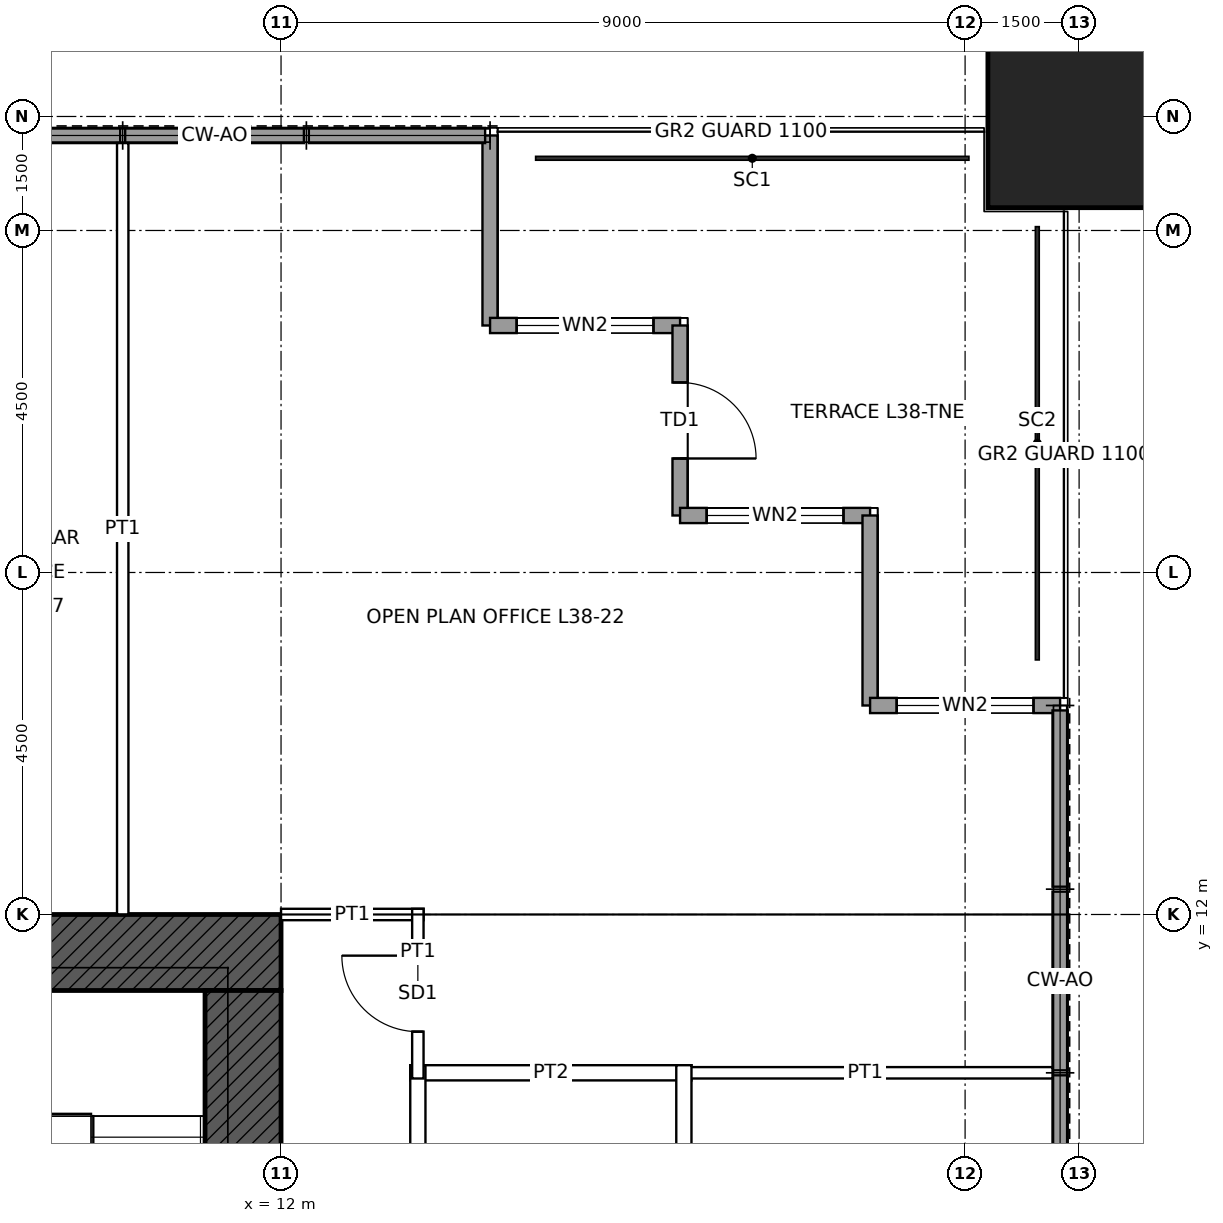
"""IFC4 building model, lengths in metres.
Left out: names, types, materials, properties, quantities, classifications, styles, units other than length and angle.
Written with IfcOpenShell. Run it as: python <this file> out.ifc"""

import sys

from ifc_helpers import new_model, si_unit, direction, frame, frame_2d, origin, origin_2d, place, context, subcontext, project, spatial, rectangle, hollow_rectangle, extrude, element, fill, save


model = new_model("IFC4")
c1 = context("Model", 3, precision=1e-05, world=origin(), true_north=direction((0.0, 1.0)))
c2 = subcontext(c1, "Body", "Model", "MODEL_VIEW")
j1 = project(units=[si_unit("LENGTHUNIT", "METRE"), si_unit("PLANEANGLEUNIT", "RADIAN")], contexts=[c1])
p1 = place(None, origin())
s1 = spatial("IfcSite", under=j1, at=p1, CompositionType="ELEMENT")
p2 = place(p1, origin())
s2 = spatial("IfcBuilding", under=s1, at=p2, CompositionType="ELEMENT")
p3 = place(p2, frame((0.0, 0.0, 185.9)))
s3 = spatial("IfcBuildingStorey", under=s2, at=p3, CompositionType="ELEMENT", Elevation=185.9)
p4 = place(p3, frame((22.5, 22.5, 0.0), z_axis=(0.0, 0.0, 1.0), x_axis=(1.0, 0.0, 0.0)))
e1 = element("IfcColumn", 1, at=p4, inside=s3, PredefinedType="COLUMN", context=c2, shape_type="SweptSolid", body=[
    extrude(hollow_rectangle(XDim=2.4, YDim=2.4, WallThickness=0.12, at=origin_2d()), origin(), (0.0, 0.0, 1.0), 4.0),
])
p5 = place(p3, frame((-12.0, 11.5, 0.0), z_axis=(0.0, 0.0, 1.0), x_axis=(1.0, 0.0, 0.0)))
e2 = element("IfcWall", 2, at=p5, inside=s3, PredefinedType="SHEAR", context=c2, shape_type="SweptSolid", body=[
    extrude(rectangle(XDim=24.0, YDim=1.0, at=frame_2d((12.0, 0.0))), origin(), (0.0, 0.0, 1.0), 4.0),
])
p6 = place(p5, frame((6.25, 0.0, 0.0)))
e3 = element("IfcOpeningElement", 3, at=p6, cuts=e2, PredefinedType="OPENING", context=c2, shape_type="SweptSolid", body=[
    extrude(rectangle(XDim=1.0, YDim=2.4, at=frame_2d((0.5, 1.2))), frame((0.0, 0.51, 0.0), z_axis=(0.0, -1.0, 0.0), x_axis=(1.0, 0.0, 0.0)), (0.0, 0.0, 1.0), 1.02),
])
p7 = place(p5, frame((16.75, 0.0, 0.0)))
e4 = element("IfcOpeningElement", 4, at=p7, cuts=e2, PredefinedType="OPENING", context=c2, shape_type="SweptSolid", body=[
    extrude(rectangle(XDim=1.0, YDim=2.4, at=frame_2d((0.5, 1.2))), frame((0.0, 0.51, 0.0), z_axis=(0.0, -1.0, 0.0), x_axis=(1.0, 0.0, 0.0)), (0.0, 0.0, 1.0), 1.02),
])
p8 = place(p3, frame((11.5, 11.0, 0.0), z_axis=(0.0, 0.0, 1.0), x_axis=(0.0, -1.0, 0.0)))
e5 = element("IfcWall", 5, at=p8, inside=s3, PredefinedType="SHEAR", context=c2, shape_type="SweptSolid", body=[
    extrude(rectangle(XDim=22.0, YDim=1.0, at=frame_2d((11.0, 0.0))), origin(), (0.0, 0.0, 1.0), 4.0),
])
p9 = place(p8, frame((10.5, 0.0, 0.0)))
e6 = element("IfcOpeningElement", 6, at=p9, cuts=e5, PredefinedType="OPENING", context=c2, shape_type="SweptSolid", body=[
    extrude(rectangle(XDim=1.0, YDim=2.4, at=frame_2d((0.5, 1.2))), frame((0.0, 0.51, 0.0), z_axis=(0.0, -1.0, 0.0), x_axis=(1.0, 0.0, 0.0)), (0.0, 0.0, 1.0), 1.02),
])
p10 = place(p3, frame((14.75, 22.25, 0.0), z_axis=(0.0, 0.0, 1.0), x_axis=(0.0, -1.0, 0.0)))
e7 = element("IfcWall", 7, at=p10, inside=s3, PredefinedType="SOLIDWALL", context=c2, shape_type="SweptSolid", body=[
    extrude(rectangle(XDim=2.5, YDim=0.2, at=frame_2d((1.25, 0.0))), origin(), (0.0, 0.0, 1.0), 3.85),
])
p11 = place(p3, frame((14.75, 19.75, 0.0), z_axis=(0.0, 0.0, 1.0), x_axis=(1.0, 0.0, 0.0)))
e8 = element("IfcWall", 8, at=p11, inside=s3, PredefinedType="SOLIDWALL", context=c2, shape_type="SweptSolid", body=[
    extrude(rectangle(XDim=2.5, YDim=0.2, at=frame_2d((1.25, 0.0))), origin(), (0.0, 0.0, 1.0), 3.85),
])
p12 = place(p11, frame((0.35, 0.0, 0.3)))
e9 = element("IfcOpeningElement", 9, at=p12, cuts=e8, PredefinedType="OPENING", context=c2, shape_type="SweptSolid", body=[
    extrude(rectangle(XDim=1.8, YDim=2.4, at=frame_2d((0.9, 1.2))), frame((0.0, 0.11, 0.0), z_axis=(0.0, -1.0, 0.0), x_axis=(1.0, 0.0, 0.0)), (0.0, 0.0, 1.0), 0.22),
])
p13 = place(p3, frame((17.25, 19.75, 0.0), z_axis=(0.0, 0.0, 1.0), x_axis=(0.0, -1.0, 0.0)))
e10 = element("IfcWall", 10, at=p13, inside=s3, PredefinedType="SOLIDWALL", context=c2, shape_type="SweptSolid", body=[
    extrude(rectangle(XDim=2.5, YDim=0.2, at=frame_2d((1.25, 0.0))), origin(), (0.0, 0.0, 1.0), 3.85),
])
p14 = place(p13, frame((0.75, 0.0, 0.0)))
e11 = element("IfcOpeningElement", 11, at=p14, cuts=e10, PredefinedType="OPENING", context=c2, shape_type="SweptSolid", body=[
    extrude(rectangle(XDim=1.0, YDim=2.4, at=frame_2d((0.5, 1.2))), frame((0.0, 0.11, 0.0), z_axis=(0.0, -1.0, 0.0), x_axis=(1.0, 0.0, 0.0)), (0.0, 0.0, 1.0), 0.22),
])
p15 = place(p3, frame((17.25, 17.25, 0.0), z_axis=(0.0, 0.0, 1.0), x_axis=(1.0, 0.0, 0.0)))
e12 = element("IfcWall", 12, at=p15, inside=s3, PredefinedType="SOLIDWALL", context=c2, shape_type="SweptSolid", body=[
    extrude(rectangle(XDim=2.5, YDim=0.2, at=frame_2d((1.25, 0.0))), origin(), (0.0, 0.0, 1.0), 3.85),
])
p16 = place(p15, frame((0.35, 0.0, 0.3)))
e13 = element("IfcOpeningElement", 13, at=p16, cuts=e12, PredefinedType="OPENING", context=c2, shape_type="SweptSolid", body=[
    extrude(rectangle(XDim=1.8, YDim=2.4, at=frame_2d((0.9, 1.2))), frame((0.0, 0.11, 0.0), z_axis=(0.0, -1.0, 0.0), x_axis=(1.0, 0.0, 0.0)), (0.0, 0.0, 1.0), 0.22),
])
p17 = place(p3, frame((19.75, 17.25, 0.0), z_axis=(0.0, 0.0, 1.0), x_axis=(0.0, -1.0, 0.0)))
e14 = element("IfcWall", 14, at=p17, inside=s3, PredefinedType="SOLIDWALL", context=c2, shape_type="SweptSolid", body=[
    extrude(rectangle(XDim=2.5, YDim=0.2, at=frame_2d((1.25, 0.0))), origin(), (0.0, 0.0, 1.0), 3.85),
])
p18 = place(p3, frame((19.75, 14.75, 0.0), z_axis=(0.0, 0.0, 1.0), x_axis=(1.0, 0.0, 0.0)))
e15 = element("IfcWall", 15, at=p18, inside=s3, PredefinedType="SOLIDWALL", context=c2, shape_type="SweptSolid", body=[
    extrude(rectangle(XDim=2.5, YDim=0.2, at=frame_2d((1.25, 0.0))), origin(), (0.0, 0.0, 1.0), 3.85),
])
p19 = place(p18, frame((0.35, 0.0, 0.3)))
e16 = element("IfcOpeningElement", 16, at=p19, cuts=e15, PredefinedType="OPENING", context=c2, shape_type="SweptSolid", body=[
    extrude(rectangle(XDim=1.8, YDim=2.4, at=frame_2d((0.9, 1.2))), frame((0.0, 0.11, 0.0), z_axis=(0.0, -1.0, 0.0), x_axis=(1.0, 0.0, 0.0)), (0.0, 0.0, 1.0), 0.22),
])
p20 = place(p3, frame((7.565, 22.25, 0.0), z_axis=(0.0, 0.0, 1.0), x_axis=(1.0, 0.0, 0.0)))
e17 = element("IfcWall", 17, at=p20, inside=s3, PredefinedType="SOLIDWALL", context=c2, shape_type="SweptSolid", body=[
    extrude(rectangle(XDim=2.319, YDim=0.2, at=frame_2d((1.16, 0.0))), origin(), (0.0, 0.0, 1.0), 3.85),
])
p21 = place(p3, frame((9.949, 22.25, 0.0), z_axis=(0.0, 0.0, 1.0), x_axis=(1.0, 0.0, 0.0)))
e18 = element("IfcWall", 18, at=p21, inside=s3, PredefinedType="SOLIDWALL", context=c2, shape_type="SweptSolid", body=[
    extrude(rectangle(XDim=2.352, YDim=0.2, at=frame_2d((1.176, 0.0))), origin(), (0.0, 0.0, 1.0), 3.85),
])
for number, where, z_axis, x_axis in (
    (19, (12.366, 22.25, 0.0), (0.0, 0.0, 1.0), (1.0, 0.0, 0.0)),
    (20, (22.25, 14.685, 0.0), (0.0, 0.0, 1.0), (0.0, -1.0, 0.0)),
):
    element("IfcWall", number, at=place(p3, frame(where, z_axis=z_axis, x_axis=x_axis)), inside=s3, PredefinedType="SOLIDWALL", context=c2, shape_type="SweptSolid", body=[
        extrude(rectangle(XDim=2.319, YDim=0.2, at=frame_2d((1.16, 0.0))), origin(), (0.0, 0.0, 1.0), 3.85),
    ])
p22 = place(p3, frame((22.25, 12.301, 0.0), z_axis=(0.0, 0.0, 1.0), x_axis=(0.0, -1.0, 0.0)))
e21 = element("IfcWall", 21, at=p22, inside=s3, PredefinedType="SOLIDWALL", context=c2, shape_type="SweptSolid", body=[
    extrude(rectangle(XDim=2.352, YDim=0.2, at=frame_2d((1.176, 0.0))), origin(), (0.0, 0.0, 1.0), 3.85),
])
p23 = place(p3, frame((22.25, 9.884, 0.0), z_axis=(0.0, 0.0, 1.0), x_axis=(0.0, -1.0, 0.0)))
e22 = element("IfcWall", 22, at=p23, inside=s3, PredefinedType="SOLIDWALL", context=c2, shape_type="SweptSolid", body=[
    extrude(rectangle(XDim=2.319, YDim=0.2, at=frame_2d((1.16, 0.0))), origin(), (0.0, 0.0, 1.0), 3.85),
])
p24 = place(p3, frame((13.7, 9.917, 0.0), z_axis=(0.0, 0.0, 1.0), x_axis=(1.0, 0.0, 0.0)))
e23 = element("IfcWall", 23, at=p24, inside=s3, PredefinedType="PARTITIONING", context=c2, shape_type="SweptSolid", body=[
    extrude(rectangle(XDim=3.7, YDim=0.2, at=frame_2d((1.85, 0.0))), origin(), (0.0, 0.0, 1.0), 3.85),
])
p25 = place(p3, frame((17.225, 9.917, 0.0), z_axis=(0.0, 0.0, 1.0), x_axis=(1.0, 0.0, 0.0)))
e24 = element("IfcWall", 24, at=p25, inside=s3, PredefinedType="PARTITIONING", context=c2, shape_type="SweptSolid", body=[
    extrude(rectangle(XDim=4.925, YDim=0.15, at=frame_2d((2.462, 0.0))), origin(), (0.0, 0.0, 1.0), 3.85),
])
p26 = place(p3, frame((12.0, 12.0, 0.0), z_axis=(0.0, 0.0, 1.0), x_axis=(1.0, 0.0, 0.0)))
e25 = element("IfcWall", 25, at=p26, inside=s3, PredefinedType="PARTITIONING", context=c2, shape_type="SweptSolid", body=[
    extrude(rectangle(XDim=1.875, YDim=0.15, at=frame_2d((0.938, 0.0))), origin(), (0.0, 0.0, 1.0), 2.908),
])
p27 = place(p3, frame((9.917, 12.0, 0.0), z_axis=(0.0, 0.0, 1.0), x_axis=(0.0, 1.0, 0.0)))
e26 = element("IfcWall", 26, at=p27, inside=s3, PredefinedType="PARTITIONING", context=c2, shape_type="SweptSolid", body=[
    extrude(rectangle(XDim=10.15, YDim=0.15, at=frame_2d((5.075, 0.0))), origin(), (0.0, 0.0, 1.0), 3.85),
])
p28 = place(p3, frame((13.8, 4.9, 0.0), z_axis=(0.0, 0.0, 1.0), x_axis=(0.0, 1.0, 0.0)))
e27 = element("IfcWall", 27, at=p28, inside=s3, PredefinedType="PARTITIONING", context=c2, shape_type="SweptSolid", body=[
    extrude(rectangle(XDim=5.117, YDim=0.2, at=frame_2d((2.559, 0.0))), origin(), (0.0, 0.0, 1.0), 3.85),
])
p29 = place(p3, frame((13.8, 9.842, 0.0), z_axis=(0.0, 0.0, 1.0), x_axis=(0.0, 1.0, 0.0)))
e28 = element("IfcWall", 28, at=p29, inside=s3, PredefinedType="PARTITIONING", context=c2, shape_type="SweptSolid", body=[
    extrude(rectangle(XDim=2.233, YDim=0.15, at=frame_2d((1.116, 0.0))), origin(), (0.0, 0.0, 1.0), 3.85),
])
p30 = place(p29, frame((0.616, 0.0, 0.0)))
e29 = element("IfcOpeningElement", 29, at=p30, cuts=e28, PredefinedType="OPENING", context=c2, shape_type="SweptSolid", body=[
    extrude(rectangle(XDim=1.0, YDim=2.4, at=frame_2d((0.5, 1.2))), frame((0.0, 0.085, 0.0), z_axis=(0.0, -1.0, 0.0), x_axis=(1.0, 0.0, 0.0)), (0.0, 0.0, 1.0), 0.17),
])
p31 = place(p3, frame((17.3, 4.9, 0.0), z_axis=(0.0, 0.0, 1.0), x_axis=(0.0, 1.0, 0.0)))
e30 = element("IfcWall", 30, at=p31, inside=s3, PredefinedType="PARTITIONING", context=c2, shape_type="SweptSolid", body=[
    extrude(rectangle(XDim=5.117, YDim=0.2, at=frame_2d((2.559, 0.0))), origin(), (0.0, 0.0, 1.0), 3.85),
])
p32 = place(p31, frame((2.059, 0.0, 0.0)))
e31 = element("IfcOpeningElement", 31, at=p32, cuts=e30, PredefinedType="OPENING", context=c2, shape_type="SweptSolid", body=[
    extrude(rectangle(XDim=1.0, YDim=2.1, at=frame_2d((0.5, 1.05))), frame((0.0, 0.11, 0.0), z_axis=(0.0, -1.0, 0.0), x_axis=(1.0, 0.0, 0.0)), (0.0, 0.0, 1.0), 0.22),
])
p33 = place(p12, origin())
e32 = element("IfcWindow", 32, at=p33, inside=s3, PartitioningType="SINGLE_PANEL", PredefinedType="WINDOW", context=c2, shape_type="SweptSolid", body=[
    extrude(rectangle(XDim=1.8, YDim=2.4, at=frame_2d((0.9, 1.2))), frame((0.0, 0.03, 0.0), z_axis=(0.0, -1.0, 0.0), x_axis=(1.0, 0.0, 0.0)), (0.0, 0.0, 1.0), 0.06),
])
fill(e9, e32)
p34 = place(p14, origin())
e33 = element("IfcDoor", 33, at=p34, inside=s3, OperationType="SINGLE_SWING_RIGHT", PredefinedType="DOOR", context=c2, shape_type="SweptSolid", body=[
    extrude(rectangle(XDim=1.0, YDim=2.4, at=frame_2d((0.5, 1.2))), frame((0.0, 0.025, 0.0), z_axis=(0.0, -1.0, 0.0), x_axis=(1.0, 0.0, 0.0)), (0.0, 0.0, 1.0), 0.05),
])
fill(e11, e33)
p35 = place(p16, origin())
e34 = element("IfcWindow", 34, at=p35, inside=s3, PartitioningType="SINGLE_PANEL", PredefinedType="WINDOW", context=c2, shape_type="SweptSolid", body=[
    extrude(rectangle(XDim=1.8, YDim=2.4, at=frame_2d((0.9, 1.2))), frame((0.0, 0.03, 0.0), z_axis=(0.0, -1.0, 0.0), x_axis=(1.0, 0.0, 0.0)), (0.0, 0.0, 1.0), 0.06),
])
fill(e13, e34)
p36 = place(p19, origin())
e35 = element("IfcWindow", 35, at=p36, inside=s3, PartitioningType="SINGLE_PANEL", PredefinedType="WINDOW", context=c2, shape_type="SweptSolid", body=[
    extrude(rectangle(XDim=1.8, YDim=2.4, at=frame_2d((0.9, 1.2))), frame((0.0, 0.03, 0.0), z_axis=(0.0, -1.0, 0.0), x_axis=(1.0, 0.0, 0.0)), (0.0, 0.0, 1.0), 0.06),
])
fill(e16, e35)
p37 = place(p30, origin())
e36 = element("IfcDoor", 36, at=p37, inside=s3, OperationType="SINGLE_SWING_RIGHT", PredefinedType="DOOR", context=c2, shape_type="SweptSolid", body=[
    extrude(rectangle(XDim=1.0, YDim=2.4, at=frame_2d((0.5, 1.2))), frame((0.0, 0.025, 0.0), z_axis=(0.0, -1.0, 0.0), x_axis=(1.0, 0.0, 0.0)), (0.0, 0.0, 1.0), 0.05),
])
fill(e29, e36)
save(model, sys.argv[1])
